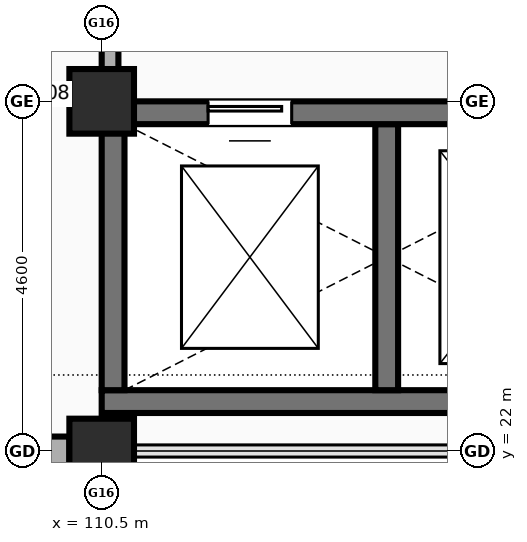
"""IFC4 building model, lengths in metres.
Left out: names, types, materials, properties, quantities, classifications, styles, units other than length and angle.
Written with IfcOpenShell. Run it as: python <this file> out.ifc"""

import sys

from ifc_helpers import new_model, si_unit, direction, frame, frame_2d, origin, origin_2d, place, context, subcontext, project, spatial, rectangle, extrude, element, fill, save


model = new_model("IFC4")
c1 = context("Model", 3, precision=1e-05, world=origin(), true_north=direction((0.0, 1.0)))
c2 = subcontext(c1, "Body", "Model", "MODEL_VIEW")
j1 = project(units=[si_unit("LENGTHUNIT", "METRE"), si_unit("PLANEANGLEUNIT", "RADIAN")], contexts=[c1])
p1 = place(None, origin())
s1 = spatial("IfcSite", under=j1, at=p1, CompositionType="ELEMENT")
p2 = place(p1, origin())
s2 = spatial("IfcBuilding", under=s1, at=p2, CompositionType="ELEMENT")
p3 = place(p2, origin())
s3 = spatial("IfcBuildingStorey", under=s2, at=p3, CompositionType="ELEMENT", Elevation=0.0)
for number, where, z_axis, x_axis in (
    (1, (110.5, 22.0, 0.0), (0.0, 0.0, 1.0), (1.0, 0.0, 0.0)),
    (2, (110.5, 26.6, 0.0), (0.0, 0.0, 1.0), (1.0, 0.0, 0.0)),
):
    element("IfcColumn", number, at=place(p3, frame(where, z_axis=z_axis, x_axis=x_axis)), inside=s3, PredefinedType="COLUMN", context=c2, shape_type="SweptSolid", body=[
        extrude(rectangle(XDim=0.85, YDim=0.85, at=origin_2d()), origin(), (0.0, 0.0, 1.0), 5.4),
    ])
p4 = place(p3, frame((110.5, 22.65, 0.0), z_axis=(0.0, 0.0, 1.0), x_axis=(1.0, 0.0, 0.0)))
e3 = element("IfcWall", 3, at=p4, inside=s3, PredefinedType="SHEAR", context=c2, shape_type="SweptSolid", body=[
    extrude(rectangle(XDim=7.5, YDim=0.3, at=frame_2d((3.75, 0.0))), origin(), (0.0, 0.0, 1.0), 5.4),
])
for number, where, z_axis, x_axis in (
    (4, (110.65, 22.8, 0.0), (0.0, 0.0, 1.0), (0.0, 1.0, 0.0)),
    (5, (114.25, 22.8, 0.0), (0.0, 0.0, 1.0), (0.0, 1.0, 0.0)),
):
    element("IfcWall", number, at=place(p3, frame(where, z_axis=z_axis, x_axis=x_axis)), inside=s3, PredefinedType="SHEAR", context=c2, shape_type="SweptSolid", body=[
        extrude(rectangle(XDim=3.5, YDim=0.3, at=frame_2d((1.75, 0.0))), origin(), (0.0, 0.0, 1.0), 5.4),
    ])
p5 = place(p3, frame((103.6, 22.0, 0.0), z_axis=(0.0, 0.0, 1.0), x_axis=(1.0, 0.0, 0.0)))
e6 = element("IfcWall", 6, at=p5, inside=s3, PredefinedType="SOLIDWALL", context=c2, shape_type="SweptSolid", body=[
    extrude(rectangle(XDim=6.475, YDim=0.38, at=frame_2d((3.237, 0.0))), origin(), (0.0, 0.0, 1.0), 4.15),
])
p6 = place(p5, frame((4.45, 0.0, 0.0), z_axis=(0.0, 0.0, 1.0), x_axis=(-1.0, 0.0, 0.0)))
e7 = element("IfcOpeningElement", 7, at=p6, cuts=e6, PredefinedType="OPENING", context=c2, shape_type="SweptSolid", body=[
    extrude(rectangle(XDim=2.6, YDim=2.9, at=frame_2d((1.3, 1.45))), frame((0.0, 0.2, 0.0), z_axis=(0.0, -1.0, 0.0), x_axis=(1.0, 0.0, 0.0)), (0.0, 0.0, 1.0), 0.4),
])
p7 = place(p3, frame((110.5, 26.45, 0.0), z_axis=(0.0, 0.0, 1.0), x_axis=(1.0, 0.0, 0.0)))
e8 = element("IfcWall", 8, at=p7, inside=s3, PredefinedType="SHEAR", context=c2, shape_type="SweptSolid", body=[
    extrude(rectangle(XDim=7.5, YDim=0.3, at=frame_2d((3.75, 0.0))), origin(), (0.0, 0.0, 1.0), 5.4),
])
p8 = place(p7, frame((1.4, 0.0, 0.0)))
e9 = element("IfcOpeningElement", 9, at=p8, cuts=e8, PredefinedType="OPENING", context=c2, shape_type="SweptSolid", body=[
    extrude(rectangle(XDim=1.1, YDim=2.15, at=frame_2d((0.55, 1.075))), frame((0.0, 0.16, 0.0), z_axis=(0.0, -1.0, 0.0), x_axis=(1.0, 0.0, 0.0)), (0.0, 0.0, 1.0), 0.32),
])
p9 = place(p7, frame((5.0, 0.0, 0.0)))
e10 = element("IfcOpeningElement", 10, at=p9, cuts=e8, PredefinedType="OPENING", context=c2, shape_type="SweptSolid", body=[
    extrude(rectangle(XDim=1.6, YDim=2.25, at=frame_2d((0.8, 1.125))), frame((0.0, 0.16, 0.0), z_axis=(0.0, -1.0, 0.0), x_axis=(1.0, 0.0, 0.0)), (0.0, 0.0, 1.0), 0.32),
])
p10 = place(p3, frame((110.61, 26.75, 0.0), z_axis=(0.0, 0.0, 1.0), x_axis=(0.0, 1.0, 0.0)))
e11 = element("IfcWall", 11, at=p10, inside=s3, PredefinedType="SOLIDWALL", context=c2, shape_type="SweptSolid", body=[
    extrude(rectangle(XDim=3.83, YDim=0.22, at=frame_2d((1.915, 0.0))), origin(), (0.0, 0.0, 1.0), 4.2),
])
p11 = place(p8, origin())
e12 = element("IfcDoor", 12, at=p11, inside=s3, OperationType="SLIDING_TO_LEFT", PredefinedType="DOOR", context=c2, shape_type="SweptSolid", body=[
    extrude(rectangle(XDim=1.1, YDim=2.15, at=frame_2d((0.55, 1.075))), frame((0.0, 0.025, 0.0), z_axis=(0.0, -1.0, 0.0), x_axis=(1.0, 0.0, 0.0)), (0.0, 0.0, 1.0), 0.05),
])
fill(e9, e12)
save(model, sys.argv[1])
